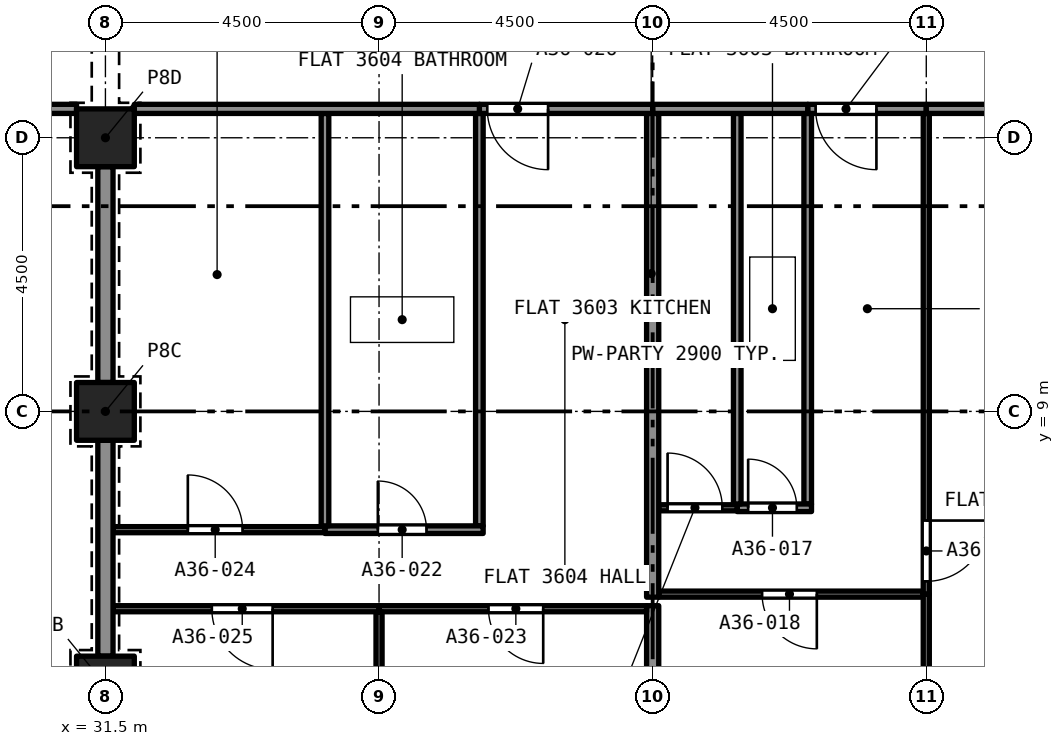
"""IFC4 building model, lengths in metres.
Left out: names, types, materials, properties, quantities, classifications, styles, units other than length and angle.
Written with IfcOpenShell. Run it as: python <this file> out.ifc"""

import sys

from ifc_helpers import new_model, si_unit, direction, frame, frame_2d, origin, origin_2d, place, context, subcontext, project, spatial, rectangle, extrude, element, fill, save


model = new_model("IFC4")
c1 = context("Model", 3, precision=1e-05, world=origin(), true_north=direction((0.0, 1.0)))
c2 = subcontext(c1, "Body", "Model", "MODEL_VIEW")
j1 = project(units=[si_unit("LENGTHUNIT", "METRE"), si_unit("PLANEANGLEUNIT", "RADIAN")], contexts=[c1])
p1 = place(None, origin())
s1 = spatial("IfcSite", under=j1, at=p1, CompositionType="ELEMENT")
p2 = place(p1, origin())
s2 = spatial("IfcBuilding", under=s1, at=p2, CompositionType="ELEMENT")
p3 = place(p2, frame((0.0, 0.0, 130.2)))
s3 = spatial("IfcBuildingStorey", under=s2, at=p3, CompositionType="ELEMENT", Elevation=130.2)
for number, where, z_axis, x_axis in (
    (1, (31.5, 4.5, 0.0), (0.0, 0.0, 1.0), (1.0, 0.0, 0.0)),
    (2, (31.5, 9.0, 0.0), (0.0, 0.0, 1.0), (1.0, 0.0, 0.0)),
    (3, (31.5, 13.5, 0.0), (0.0, 0.0, 1.0), (1.0, 0.0, 0.0)),
):
    element("IfcColumn", number, at=place(p3, frame(where, z_axis=z_axis, x_axis=x_axis)), inside=s3, PredefinedType="COLUMN", context=c2, shape_type="SweptSolid", body=[
        extrude(rectangle(XDim=0.95, YDim=0.95, at=origin_2d()), origin(), (0.0, 0.0, 1.0), 3.2),
    ])
p4 = place(p3, frame((43.05, 7.478, 0.0), z_axis=(0.0, 0.0, 1.0), x_axis=(0.0, 1.0, 0.0)))
e4 = element("IfcWall", 4, at=p4, inside=s3, PredefinedType="PARTITIONING", context=c2, shape_type="SweptSolid", body=[
    extrude(rectangle(XDim=6.422, YDim=0.125, at=frame_2d((3.211, 0.0))), origin(), (0.0, 0.0, 1.0), 2.9),
])
p5 = place(p3, frame((41.891, 7.415, 0.0), z_axis=(0.0, 0.0, 1.0), x_axis=(1.0, 0.0, 0.0)))
e5 = element("IfcWall", 5, at=p5, inside=s3, PredefinedType="PARTITIONING", context=c2, shape_type="SweptSolid", body=[
    extrude(rectangle(XDim=1.222, YDim=0.125, at=frame_2d((0.611, 0.0))), origin(), (0.0, 0.0, 1.0), 2.9),
])
p6 = place(p5, frame((0.179, 0.0, 0.0)))
e6 = element("IfcOpeningElement", 6, at=p6, cuts=e5, PredefinedType="OPENING", context=c2, shape_type="SweptSolid", body=[
    extrude(rectangle(XDim=0.8, YDim=2.1, at=frame_2d((0.4, 1.05))), frame((0.0, 0.073, 0.0), z_axis=(0.0, -1.0, 0.0), x_axis=(1.0, 0.0, 0.0)), (0.0, 0.0, 1.0), 0.145),
])
p7 = place(p3, frame((41.891, 7.478, 0.0), z_axis=(0.0, 0.0, 1.0), x_axis=(0.0, 1.0, 0.0)))
e7 = element("IfcWall", 7, at=p7, inside=s3, PredefinedType="PARTITIONING", context=c2, shape_type="SweptSolid", body=[
    extrude(rectangle(XDim=6.422, YDim=0.125, at=frame_2d((3.211, 0.0))), origin(), (0.0, 0.0, 1.0), 2.9),
])
p8 = place(p3, frame((44.95, 5.995, 0.0), z_axis=(0.0, 0.0, 1.0), x_axis=(-1.0, 0.0, 0.0)))
e8 = element("IfcWall", 8, at=p8, inside=s3, PredefinedType="PARTITIONING", context=c2, shape_type="SweptSolid", body=[
    extrude(rectangle(XDim=4.35, YDim=0.1, at=frame_2d((2.175, 0.0))), origin(), (0.0, 0.0, 1.0), 2.9),
])
p9 = place(p8, frame((1.75, 0.0, 0.0)))
e9 = element("IfcOpeningElement", 9, at=p9, cuts=e8, PredefinedType="OPENING", context=c2, shape_type="SweptSolid", body=[
    extrude(rectangle(XDim=0.9, YDim=2.1, at=frame_2d((0.45, 1.05))), frame((0.0, 0.06, 0.0), z_axis=(0.0, -1.0, 0.0), x_axis=(1.0, 0.0, 0.0)), (0.0, 0.0, 1.0), 0.12),
])
p10 = place(p3, frame((45.0, 0.514, 0.0), z_axis=(0.0, 0.0, 1.0), x_axis=(0.0, 1.0, 0.0)))
e10 = element("IfcWall", 10, at=p10, inside=s3, PredefinedType="PARTITIONING", context=c2, shape_type="SweptSolid", body=[
    extrude(rectangle(XDim=5.481, YDim=0.1, at=frame_2d((2.74, 0.0))), origin(), (0.0, 0.0, 1.0), 2.9),
])
p11 = place(p3, frame((40.5, 0.475, 0.0), z_axis=(0.0, 0.0, 1.0), x_axis=(0.0, 1.0, 0.0)))
e11 = element("IfcWall", 11, at=p11, inside=s3, PredefinedType="PARTITIONING", context=c2, shape_type="SweptSolid", body=[
    extrude(rectangle(XDim=5.33, YDim=0.2, at=frame_2d((2.665, 0.0))), origin(), (0.0, 0.0, 1.0), 2.9),
])
p12 = place(p3, frame((40.6, 7.415, 0.0), z_axis=(0.0, 0.0, 1.0), x_axis=(1.0, 0.0, 0.0)))
e12 = element("IfcWall", 12, at=p12, inside=s3, PredefinedType="PARTITIONING", context=c2, shape_type="SweptSolid", body=[
    extrude(rectangle(XDim=1.291, YDim=0.1, at=frame_2d((0.646, 0.0))), origin(), (0.0, 0.0, 1.0), 2.9),
])
p13 = place(p12, frame((0.146, 0.0, 0.0)))
e13 = element("IfcOpeningElement", 13, at=p13, cuts=e12, PredefinedType="OPENING", context=c2, shape_type="SweptSolid", body=[
    extrude(rectangle(XDim=0.9, YDim=2.1, at=frame_2d((0.45, 1.05))), frame((0.0, 0.06, 0.0), z_axis=(0.0, -1.0, 0.0), x_axis=(1.0, 0.0, 0.0)), (0.0, 0.0, 1.0), 0.12),
])
p14 = place(p3, frame((45.0, 13.9, 0.0), z_axis=(0.0, 0.0, 1.0), x_axis=(0.0, -1.0, 0.0)))
e14 = element("IfcWall", 14, at=p14, inside=s3, PredefinedType="PARTITIONING", context=c2, shape_type="SweptSolid", body=[
    extrude(rectangle(XDim=7.905, YDim=0.1, at=frame_2d((3.952, 0.0))), origin(), (0.0, 0.0, 1.0), 2.9),
])
p15 = place(p14, frame((6.695, 0.0, 0.0)))
e15 = element("IfcOpeningElement", 15, at=p15, cuts=e14, PredefinedType="OPENING", context=c2, shape_type="SweptSolid", body=[
    extrude(rectangle(XDim=1.0, YDim=2.1, at=frame_2d((0.5, 1.05))), frame((0.0, 0.06, 0.0), z_axis=(0.0, -1.0, 0.0), x_axis=(1.0, 0.0, 0.0)), (0.0, 0.0, 1.0), 0.12),
])
p16 = place(p3, frame((40.5, 5.945, 0.0), z_axis=(0.0, 0.0, 1.0), x_axis=(0.0, 1.0, 0.0)))
e16 = element("IfcWall", 16, at=p16, inside=s3, PredefinedType="PARTITIONING", context=c2, shape_type="SweptSolid", body=[
    extrude(rectangle(XDim=7.955, YDim=0.2, at=frame_2d((3.978, 0.0))), origin(), (0.0, 0.0, 1.0), 2.9),
])
p17 = place(p3, frame((45.0, 13.975, 0.0), z_axis=(0.0, 0.0, 1.0), x_axis=(-1.0, 0.0, 0.0)))
e17 = element("IfcWall", 17, at=p17, inside=s3, PredefinedType="PARTITIONING", context=c2, shape_type="SweptSolid", body=[
    extrude(rectangle(XDim=1.95, YDim=0.15, at=frame_2d((0.975, 0.0))), origin(), (0.0, 0.0, 1.0), 2.9),
])
p18 = place(p17, frame((0.82, 0.0, 0.0)))
e18 = element("IfcOpeningElement", 18, at=p18, cuts=e17, PredefinedType="OPENING", context=c2, shape_type="SweptSolid", body=[
    extrude(rectangle(XDim=1.0, YDim=2.1, at=frame_2d((0.5, 1.05))), frame((0.0, 0.085, 0.0), z_axis=(0.0, -1.0, 0.0), x_axis=(1.0, 0.0, 0.0)), (0.0, 0.0, 1.0), 0.17),
])
p19 = place(p3, frame((40.5, 13.975, 0.0), z_axis=(0.0, 0.0, 1.0), x_axis=(1.0, 0.0, 0.0)))
e19 = element("IfcWall", 19, at=p19, inside=s3, PredefinedType="PARTITIONING", context=c2, shape_type="SweptSolid", body=[
    extrude(rectangle(XDim=2.55, YDim=0.15, at=frame_2d((1.275, 0.0))), origin(), (0.0, 0.0, 1.0), 2.9),
])
p20 = place(p3, frame((45.0, 13.975, 0.0), z_axis=(0.0, 0.0, 1.0), x_axis=(1.0, 0.0, 0.0)))
e20 = element("IfcWall", 20, at=p20, inside=s3, PredefinedType="PARTITIONING", context=c2, shape_type="SweptSolid", body=[
    extrude(rectangle(XDim=4.025, YDim=0.15, at=frame_2d((2.012, 0.0))), origin(), (0.0, 0.0, 1.0), 2.9),
])
p21 = place(p3, frame((37.65, 7.117, 0.0), z_axis=(0.0, 0.0, 1.0), x_axis=(0.0, 1.0, 0.0)))
e21 = element("IfcWall", 21, at=p21, inside=s3, PredefinedType="PARTITIONING", context=c2, shape_type="SweptSolid", body=[
    extrude(rectangle(XDim=6.782, YDim=0.125, at=frame_2d((3.391, 0.0))), origin(), (0.0, 0.0, 1.0), 2.9),
])
p22 = place(p3, frame((35.111, 7.055, 0.0), z_axis=(0.0, 0.0, 1.0), x_axis=(1.0, 0.0, 0.0)))
e22 = element("IfcWall", 22, at=p22, inside=s3, PredefinedType="PARTITIONING", context=c2, shape_type="SweptSolid", body=[
    extrude(rectangle(XDim=2.602, YDim=0.125, at=frame_2d((1.301, 0.0))), origin(), (0.0, 0.0, 1.0), 2.9),
])
p23 = place(p22, frame((0.87, 0.0, 0.0)))
e23 = element("IfcOpeningElement", 23, at=p23, cuts=e22, PredefinedType="OPENING", context=c2, shape_type="SweptSolid", body=[
    extrude(rectangle(XDim=0.8, YDim=2.1, at=frame_2d((0.4, 1.05))), frame((0.0, 0.073, 0.0), z_axis=(0.0, -1.0, 0.0), x_axis=(1.0, 0.0, 0.0)), (0.0, 0.0, 1.0), 0.145),
])
p24 = place(p3, frame((35.111, 7.117, 0.0), z_axis=(0.0, 0.0, 1.0), x_axis=(0.0, 1.0, 0.0)))
e24 = element("IfcWall", 24, at=p24, inside=s3, PredefinedType="PARTITIONING", context=c2, shape_type="SweptSolid", body=[
    extrude(rectangle(XDim=6.782, YDim=0.125, at=frame_2d((3.391, 0.0))), origin(), (0.0, 0.0, 1.0), 2.9),
])
p25 = place(p3, frame((40.4, 5.755, 0.0), z_axis=(0.0, 0.0, 1.0), x_axis=(-1.0, 0.0, 0.0)))
e25 = element("IfcWall", 25, at=p25, inside=s3, PredefinedType="PARTITIONING", context=c2, shape_type="SweptSolid", body=[
    extrude(rectangle(XDim=4.4, YDim=0.1, at=frame_2d((2.2, 0.0))), origin(), (0.0, 0.0, 1.0), 2.9),
])
p26 = place(p25, frame((1.7, 0.0, 0.0)))
e26 = element("IfcOpeningElement", 26, at=p26, cuts=e25, PredefinedType="OPENING", context=c2, shape_type="SweptSolid", body=[
    extrude(rectangle(XDim=0.9, YDim=2.1, at=frame_2d((0.45, 1.05))), frame((0.0, 0.06, 0.0), z_axis=(0.0, -1.0, 0.0), x_axis=(1.0, 0.0, 0.0)), (0.0, 0.0, 1.0), 0.12),
])
p27 = place(p3, frame((36.0, 0.475, 0.0), z_axis=(0.0, 0.0, 1.0), x_axis=(0.0, 1.0, 0.0)))
e27 = element("IfcWall", 27, at=p27, inside=s3, PredefinedType="PARTITIONING", context=c2, shape_type="SweptSolid", body=[
    extrude(rectangle(XDim=5.23, YDim=0.1, at=frame_2d((2.615, 0.0))), origin(), (0.0, 0.0, 1.0), 2.9),
])
p28 = place(p3, frame((31.625, 7.055, 0.0), z_axis=(0.0, 0.0, 1.0), x_axis=(1.0, 0.0, 0.0)))
e28 = element("IfcWall", 28, at=p28, inside=s3, PredefinedType="PARTITIONING", context=c2, shape_type="SweptSolid", body=[
    extrude(rectangle(XDim=3.486, YDim=0.1, at=frame_2d((1.743, 0.0))), origin(), (0.0, 0.0, 1.0), 2.9),
])
p29 = place(p28, frame((1.23, 0.0, 0.0)))
e29 = element("IfcOpeningElement", 29, at=p29, cuts=e28, PredefinedType="OPENING", context=c2, shape_type="SweptSolid", body=[
    extrude(rectangle(XDim=0.9, YDim=2.1, at=frame_2d((0.45, 1.05))), frame((0.0, 0.06, 0.0), z_axis=(0.0, -1.0, 0.0), x_axis=(1.0, 0.0, 0.0)), (0.0, 0.0, 1.0), 0.12),
])
p30 = place(p3, frame((36.0, 5.755, 0.0), z_axis=(0.0, 0.0, 1.0), x_axis=(-1.0, 0.0, 0.0)))
e30 = element("IfcWall", 30, at=p30, inside=s3, PredefinedType="PARTITIONING", context=c2, shape_type="SweptSolid", body=[
    extrude(rectangle(XDim=4.375, YDim=0.1, at=frame_2d((2.188, 0.0))), origin(), (0.0, 0.0, 1.0), 2.9),
])
p31 = place(p30, frame((1.75, 0.0, 0.0)))
e31 = element("IfcOpeningElement", 31, at=p31, cuts=e30, PredefinedType="OPENING", context=c2, shape_type="SweptSolid", body=[
    extrude(rectangle(XDim=1.0, YDim=2.1, at=frame_2d((0.5, 1.05))), frame((0.0, 0.06, 0.0), z_axis=(0.0, -1.0, 0.0), x_axis=(1.0, 0.0, 0.0)), (0.0, 0.0, 1.0), 0.12),
])
p32 = place(p3, frame((40.5, 13.975, 0.0), z_axis=(0.0, 0.0, 1.0), x_axis=(-1.0, 0.0, 0.0)))
e32 = element("IfcWall", 32, at=p32, inside=s3, PredefinedType="PARTITIONING", context=c2, shape_type="SweptSolid", body=[
    extrude(rectangle(XDim=2.85, YDim=0.15, at=frame_2d((1.425, 0.0))), origin(), (0.0, 0.0, 1.0), 2.9),
])
p33 = place(p32, frame((1.72, 0.0, 0.0)))
e33 = element("IfcOpeningElement", 33, at=p33, cuts=e32, PredefinedType="OPENING", context=c2, shape_type="SweptSolid", body=[
    extrude(rectangle(XDim=1.0, YDim=2.1, at=frame_2d((0.5, 1.05))), frame((0.0, 0.085, 0.0), z_axis=(0.0, -1.0, 0.0), x_axis=(1.0, 0.0, 0.0)), (0.0, 0.0, 1.0), 0.17),
])
p34 = place(p3, frame((31.5, 9.475, 0.0), z_axis=(0.0, 0.0, 1.0), x_axis=(0.0, 1.0, 0.0)))
e34 = element("IfcWall", 34, at=p34, inside=s3, PredefinedType="PARTITIONING", context=c2, shape_type="SweptSolid", body=[
    extrude(rectangle(XDim=3.55, YDim=0.25, at=frame_2d((1.775, 0.0))), origin(), (0.0, 0.0, 1.0), 2.38),
])
p35 = place(p3, frame((31.975, 13.975, 0.0), z_axis=(0.0, 0.0, 1.0), x_axis=(1.0, 0.0, 0.0)))
e35 = element("IfcWall", 35, at=p35, inside=s3, PredefinedType="PARTITIONING", context=c2, shape_type="SweptSolid", body=[
    extrude(rectangle(XDim=5.675, YDim=0.15, at=frame_2d((2.837, 0.0))), origin(), (0.0, 0.0, 1.0), 2.9),
])
p36 = place(p3, frame((31.5, 4.975, 0.0), z_axis=(0.0, 0.0, 1.0), x_axis=(0.0, 1.0, 0.0)))
e36 = element("IfcWall", 36, at=p36, inside=s3, PredefinedType="PARTITIONING", context=c2, shape_type="SweptSolid", body=[
    extrude(rectangle(XDim=3.55, YDim=0.25, at=frame_2d((1.775, 0.0))), origin(), (0.0, 0.0, 1.0), 2.38),
])
p37 = place(p3, frame((31.025, 13.975, 0.0), z_axis=(0.0, 0.0, 1.0), x_axis=(-1.0, 0.0, 0.0)))
e37 = element("IfcWall", 37, at=p37, inside=s3, PredefinedType="PARTITIONING", context=c2, shape_type="SweptSolid", body=[
    extrude(rectangle(XDim=8.525, YDim=0.15, at=frame_2d((4.262, 0.0))), origin(), (0.0, 0.0, 1.0), 2.75),
])
p38 = place(p37, frame((3.525, 0.0, 0.0)))
e38 = element("IfcOpeningElement", 38, at=p38, cuts=e37, PredefinedType="OPENING", context=c2, shape_type="SweptSolid", body=[
    extrude(rectangle(XDim=1.0, YDim=2.1, at=frame_2d((0.5, 1.05))), frame((0.0, 0.085, 0.0), z_axis=(0.0, -1.0, 0.0), x_axis=(1.0, 0.0, 0.0)), (0.0, 0.0, 1.0), 0.17),
])
p39 = place(p6, origin())
e39 = element("IfcDoor", 39, at=p39, inside=s3, OperationType="SINGLE_SWING_LEFT", PredefinedType="DOOR", context=c2, shape_type="SweptSolid", body=[
    extrude(rectangle(XDim=0.8, YDim=2.1, at=frame_2d((0.4, 1.05))), frame((0.0, 0.025, 0.0), z_axis=(0.0, -1.0, 0.0), x_axis=(1.0, 0.0, 0.0)), (0.0, 0.0, 1.0), 0.05),
])
fill(e6, e39)
p40 = place(p9, origin())
e40 = element("IfcDoor", 40, at=p40, inside=s3, OperationType="SINGLE_SWING_RIGHT", PredefinedType="DOOR", context=c2, shape_type="SweptSolid", body=[
    extrude(rectangle(XDim=0.9, YDim=2.1, at=frame_2d((0.45, 1.05))), frame((0.0, 0.025, 0.0), z_axis=(0.0, -1.0, 0.0), x_axis=(1.0, 0.0, 0.0)), (0.0, 0.0, 1.0), 0.05),
])
fill(e9, e40)
p41 = place(p13, origin())
e41 = element("IfcDoor", 41, at=p41, inside=s3, OperationType="SINGLE_SWING_LEFT", PredefinedType="DOOR", context=c2, shape_type="SweptSolid", body=[
    extrude(rectangle(XDim=0.9, YDim=2.1, at=frame_2d((0.45, 1.05))), frame((0.0, 0.025, 0.0), z_axis=(0.0, -1.0, 0.0), x_axis=(1.0, 0.0, 0.0)), (0.0, 0.0, 1.0), 0.05),
])
fill(e13, e41)
p42 = place(p15, origin())
e42 = element("IfcDoor", 42, at=p42, inside=s3, OperationType="SINGLE_SWING_RIGHT", PredefinedType="DOOR", context=c2, shape_type="SweptSolid", body=[
    extrude(rectangle(XDim=1.0, YDim=2.1, at=frame_2d((0.5, 1.05))), frame((0.0, 0.025, 0.0), z_axis=(0.0, -1.0, 0.0), x_axis=(1.0, 0.0, 0.0)), (0.0, 0.0, 1.0), 0.05),
])
fill(e15, e42)
p43 = place(p18, origin())
e43 = element("IfcDoor", 43, at=p43, inside=s3, OperationType="SINGLE_SWING_RIGHT", PredefinedType="DOOR", context=c2, shape_type="SweptSolid", body=[
    extrude(rectangle(XDim=1.0, YDim=2.1, at=frame_2d((0.5, 1.05))), frame((0.0, 0.025, 0.0), z_axis=(0.0, -1.0, 0.0), x_axis=(1.0, 0.0, 0.0)), (0.0, 0.0, 1.0), 0.05),
])
fill(e18, e43)
p44 = place(p23, origin())
e44 = element("IfcDoor", 44, at=p44, inside=s3, OperationType="SINGLE_SWING_LEFT", PredefinedType="DOOR", context=c2, shape_type="SweptSolid", body=[
    extrude(rectangle(XDim=0.8, YDim=2.1, at=frame_2d((0.4, 1.05))), frame((0.0, 0.025, 0.0), z_axis=(0.0, -1.0, 0.0), x_axis=(1.0, 0.0, 0.0)), (0.0, 0.0, 1.0), 0.05),
])
fill(e23, e44)
p45 = place(p26, origin())
e45 = element("IfcDoor", 45, at=p45, inside=s3, OperationType="SINGLE_SWING_LEFT", PredefinedType="DOOR", context=c2, shape_type="SweptSolid", body=[
    extrude(rectangle(XDim=0.9, YDim=2.1, at=frame_2d((0.45, 1.05))), frame((0.0, 0.025, 0.0), z_axis=(0.0, -1.0, 0.0), x_axis=(1.0, 0.0, 0.0)), (0.0, 0.0, 1.0), 0.05),
])
fill(e26, e45)
p46 = place(p29, origin())
e46 = element("IfcDoor", 46, at=p46, inside=s3, OperationType="SINGLE_SWING_LEFT", PredefinedType="DOOR", context=c2, shape_type="SweptSolid", body=[
    extrude(rectangle(XDim=0.9, YDim=2.1, at=frame_2d((0.45, 1.05))), frame((0.0, 0.025, 0.0), z_axis=(0.0, -1.0, 0.0), x_axis=(1.0, 0.0, 0.0)), (0.0, 0.0, 1.0), 0.05),
])
fill(e29, e46)
p47 = place(p31, origin())
e47 = element("IfcDoor", 47, at=p47, inside=s3, OperationType="SINGLE_SWING_RIGHT", PredefinedType="DOOR", context=c2, shape_type="SweptSolid", body=[
    extrude(rectangle(XDim=1.0, YDim=2.1, at=frame_2d((0.5, 1.05))), frame((0.0, 0.025, 0.0), z_axis=(0.0, -1.0, 0.0), x_axis=(1.0, 0.0, 0.0)), (0.0, 0.0, 1.0), 0.05),
])
fill(e31, e47)
p48 = place(p33, origin())
e48 = element("IfcDoor", 48, at=p48, inside=s3, OperationType="SINGLE_SWING_RIGHT", PredefinedType="DOOR", context=c2, shape_type="SweptSolid", body=[
    extrude(rectangle(XDim=1.0, YDim=2.1, at=frame_2d((0.5, 1.05))), frame((0.0, 0.025, 0.0), z_axis=(0.0, -1.0, 0.0), x_axis=(1.0, 0.0, 0.0)), (0.0, 0.0, 1.0), 0.05),
])
fill(e33, e48)
save(model, sys.argv[1])
